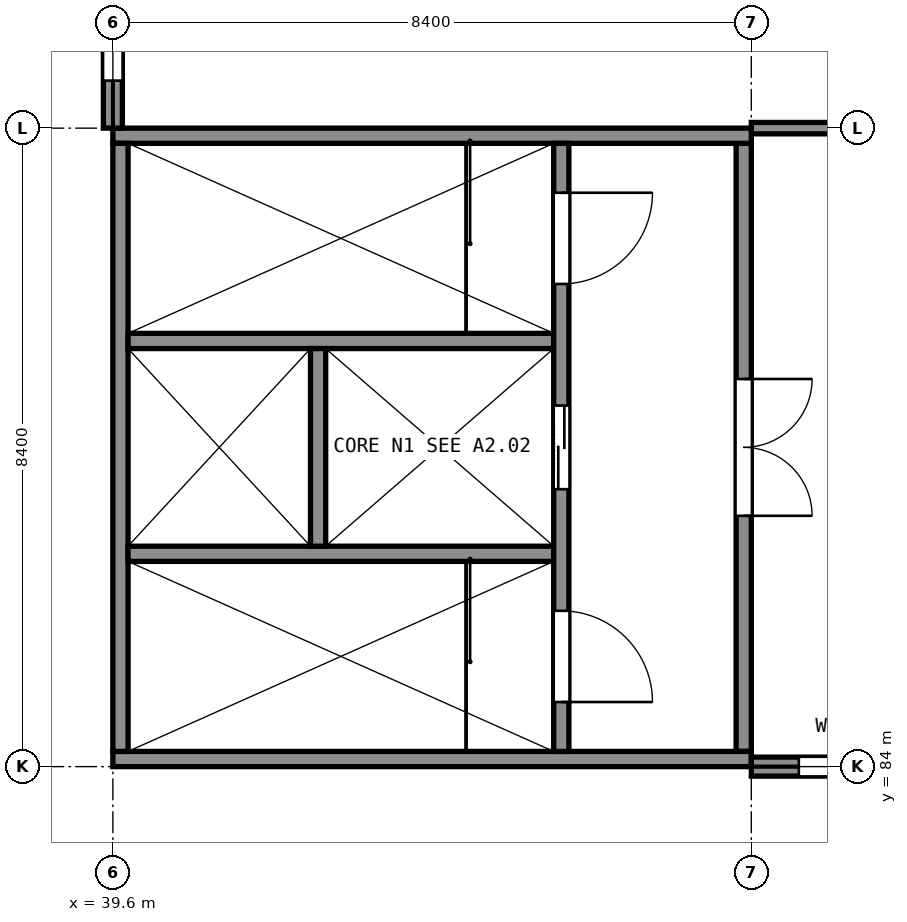
"""IFC4 building model, lengths in metres.
Left out: names, types, materials, properties, quantities, classifications, styles, units other than length and angle.
Written with IfcOpenShell. Run it as: python <this file> out.ifc"""

import sys

from ifc_helpers import new_model, si_unit, direction, frame, frame_2d, origin, place, context, subcontext, project, spatial, polyline, rectangle, outline, extrude, element, fill, save


model = new_model("IFC4")
c1 = context("Model", 3, precision=1e-05, world=origin(), true_north=direction((0.0, 1.0)))
c2 = subcontext(c1, "Body", "Model", "MODEL_VIEW")
j1 = project(units=[si_unit("LENGTHUNIT", "METRE"), si_unit("PLANEANGLEUNIT", "RADIAN")], contexts=[c1])
p1 = place(None, origin())
s1 = spatial("IfcSite", under=j1, at=p1, CompositionType="ELEMENT")
p2 = place(p1, origin())
s2 = spatial("IfcBuilding", under=s1, at=p2, CompositionType="ELEMENT")
p3 = place(p2, frame((0.0, 0.0, 20.0)))
s3 = spatial("IfcBuildingStorey", under=s2, at=p3, CompositionType="ELEMENT", Elevation=20.0)
p4 = place(p3, frame((39.6, 84.1, 0.0), z_axis=(0.0, 0.0, 1.0), x_axis=(1.0, 0.0, 0.0)))
e1 = element("IfcWall", 1, at=p4, inside=s3, PredefinedType="SHEAR", context=c2, shape_type="SweptSolid", body=[
    extrude(rectangle(XDim=8.4, YDim=0.2, at=frame_2d((4.2, 0.0))), origin(), (0.0, 0.0, 1.0), 10.375),
])
p5 = place(p3, frame((39.6, 92.3, 0.0), z_axis=(0.0, 0.0, 1.0), x_axis=(1.0, 0.0, 0.0)))
e2 = element("IfcWall", 2, at=p5, inside=s3, PredefinedType="SHEAR", context=c2, shape_type="SweptSolid", body=[
    extrude(rectangle(XDim=8.4, YDim=0.2, at=frame_2d((4.2, 0.0))), origin(), (0.0, 0.0, 1.0), 8.425),
])
p6 = place(p3, frame((39.7, 84.2, 0.0), z_axis=(0.0, 0.0, 1.0), x_axis=(0.0, 1.0, 0.0)))
e3 = element("IfcWall", 3, at=p6, inside=s3, PredefinedType="SHEAR", context=c2, shape_type="SweptSolid", body=[
    extrude(outline(polyline([(0.0, 0.0), (8.0, 0.0), (8.0, 8.448), (7.704, 8.518), (7.407, 8.589), (7.111, 8.659), (6.815, 8.73), (6.519, 8.8), (6.222, 8.871), (5.926, 8.941), (5.333, 9.083), (5.037, 9.153), (4.741, 9.224), (4.444, 9.294), (4.148, 9.365), (3.852, 9.435), (3.556, 9.506), (3.259, 9.576), (2.963, 9.647), (2.667, 9.717), (2.074, 9.859), (1.778, 9.929), (1.481, 10.0), (1.185, 10.07), (0.889, 10.141), (0.593, 10.211), (0.296, 10.282), (0.0, 10.352), (0.0, 0.0)])), frame((0.0, 0.1, 0.0), z_axis=(0.0, -1.0, 0.0), x_axis=(1.0, 0.0, 0.0)), (0.0, 0.0, 1.0), 0.2),
])
p7 = place(p3, frame((47.9, 84.2, 0.0), z_axis=(0.0, 0.0, 1.0), x_axis=(0.0, 1.0, 0.0)))
e4 = element("IfcWall", 4, at=p7, inside=s3, PredefinedType="SHEAR", context=c2, shape_type="SweptSolid", body=[
    extrude(outline(polyline([(0.0, 0.0), (8.0, 0.0), (8.0, 8.448), (7.704, 8.518), (7.407, 8.589), (7.111, 8.659), (6.815, 8.73), (6.519, 8.8), (6.222, 8.871), (5.926, 8.941), (5.333, 9.083), (5.037, 9.153), (4.741, 9.224), (4.444, 9.294), (4.148, 9.365), (3.852, 9.435), (3.556, 9.506), (3.259, 9.576), (2.963, 9.647), (2.667, 9.717), (2.074, 9.859), (1.778, 9.929), (1.481, 10.0), (1.185, 10.07), (0.889, 10.141), (0.593, 10.211), (0.296, 10.282), (0.0, 10.352), (0.0, 0.0)])), frame((0.0, 0.1, 0.0), z_axis=(0.0, -1.0, 0.0), x_axis=(1.0, 0.0, 0.0)), (0.0, 0.0, 1.0), 0.2),
])
p8 = place(p7, frame((3.1, 0.0, 0.0)))
e5 = element("IfcOpeningElement", 5, at=p8, cuts=e4, PredefinedType="OPENING", context=c2, shape_type="SweptSolid", body=[
    extrude(rectangle(XDim=1.8, YDim=2.1, at=frame_2d((0.9, 1.05))), frame((0.0, 0.11, 0.0), z_axis=(0.0, -1.0, 0.0), x_axis=(1.0, 0.0, 0.0)), (0.0, 0.0, 1.0), 0.22),
])
p9 = place(p3, frame((45.5, 84.2, 0.0), z_axis=(0.0, 0.0, 1.0), x_axis=(0.0, 1.0, 0.0)))
e6 = element("IfcWall", 6, at=p9, inside=s3, PredefinedType="SHEAR", context=c2, shape_type="SweptSolid", body=[
    extrude(outline(polyline([(0.0, 0.0), (8.0, 0.0), (8.0, 8.448), (7.704, 8.518), (7.407, 8.589), (7.111, 8.659), (6.815, 8.73), (6.519, 8.8), (6.222, 8.871), (5.926, 8.941), (5.333, 9.083), (5.037, 9.153), (4.741, 9.224), (4.444, 9.294), (4.148, 9.365), (3.852, 9.435), (3.556, 9.506), (3.259, 9.576), (2.963, 9.647), (2.667, 9.717), (2.074, 9.859), (1.778, 9.929), (1.481, 10.0), (1.185, 10.07), (0.889, 10.141), (0.593, 10.211), (0.296, 10.282), (0.0, 10.352), (0.0, 0.0)])), frame((0.0, 0.1, 0.0), z_axis=(0.0, -1.0, 0.0), x_axis=(1.0, 0.0, 0.0)), (0.0, 0.0, 1.0), 0.2),
])
p10 = place(p9, frame((0.65, 0.0, 0.0)))
e7 = element("IfcOpeningElement", 7, at=p10, cuts=e6, PredefinedType="OPENING", context=c2, shape_type="SweptSolid", body=[
    extrude(rectangle(XDim=1.2, YDim=2.1, at=frame_2d((0.6, 1.05))), frame((0.0, 0.11, 0.0), z_axis=(0.0, -1.0, 0.0), x_axis=(1.0, 0.0, 0.0)), (0.0, 0.0, 1.0), 0.22),
])
p11 = place(p9, frame((6.15, 0.0, 0.0)))
e8 = element("IfcOpeningElement", 8, at=p11, cuts=e6, PredefinedType="OPENING", context=c2, shape_type="SweptSolid", body=[
    extrude(rectangle(XDim=1.2, YDim=2.1, at=frame_2d((0.6, 1.05))), frame((0.0, 0.11, 0.0), z_axis=(0.0, -1.0, 0.0), x_axis=(1.0, 0.0, 0.0)), (0.0, 0.0, 1.0), 0.22),
])
p12 = place(p9, frame((3.45, 0.0, 0.0)))
e9 = element("IfcOpeningElement", 9, at=p12, cuts=e6, PredefinedType="OPENING", context=c2, shape_type="SweptSolid", body=[
    extrude(rectangle(XDim=1.1, YDim=2.1, at=frame_2d((0.55, 1.05))), frame((0.0, 0.11, 0.0), z_axis=(0.0, -1.0, 0.0), x_axis=(1.0, 0.0, 0.0)), (0.0, 0.0, 1.0), 0.22),
])
p13 = place(p3, frame((39.8, 86.8, 0.0), z_axis=(0.0, 0.0, 1.0), x_axis=(1.0, 0.0, 0.0)))
e10 = element("IfcWall", 10, at=p13, inside=s3, PredefinedType="SHEAR", context=c2, shape_type="SweptSolid", body=[
    extrude(rectangle(XDim=5.6, YDim=0.2, at=frame_2d((2.8, 0.0))), origin(), (0.0, 0.0, 1.0), 9.732),
])
p14 = place(p3, frame((39.8, 89.6, 0.0), z_axis=(0.0, 0.0, 1.0), x_axis=(1.0, 0.0, 0.0)))
e11 = element("IfcWall", 11, at=p14, inside=s3, PredefinedType="SHEAR", context=c2, shape_type="SweptSolid", body=[
    extrude(rectangle(XDim=5.6, YDim=0.2, at=frame_2d((2.8, 0.0))), origin(), (0.0, 0.0, 1.0), 9.067),
])
p15 = place(p3, frame((42.3, 86.9, 0.0), z_axis=(0.0, 0.0, 1.0), x_axis=(0.0, 1.0, 0.0)))
e12 = element("IfcWall", 12, at=p15, inside=s3, PredefinedType="SHEAR", context=c2, shape_type="SweptSolid", body=[
    extrude(outline(polyline([(0.0, 0.0), (2.6, 0.0), (2.6, 9.09), (1.444, 9.366), (1.156, 9.434), (0.0, 9.71), (0.0, 0.0)])), frame((0.0, 0.1, 0.0), z_axis=(0.0, -1.0, 0.0), x_axis=(1.0, 0.0, 0.0)), (0.0, 0.0, 1.0), 0.2),
])
p16 = place(p3, frame((39.6, 92.4, 0.0), z_axis=(0.0, 0.0, 1.0), x_axis=(0.0, 1.0, 0.0)))
e13 = element("IfcWall", 13, at=p16, inside=s3, PredefinedType="SOLIDWALL", context=c2, shape_type="SweptSolid", body=[
    extrude(outline(polyline([(0.0, 0.0), (8.05, 0.0), (8.05, 6.433), (0.0, 8.349), (0.0, 0.0)])), frame((0.0, 0.125, 0.0), z_axis=(0.0, -1.0, 0.0), x_axis=(1.0, 0.0, 0.0)), (0.0, 0.0, 1.0), 0.25),
])
p17 = place(p16, frame((0.625, 0.0, 0.9)))
e14 = element("IfcOpeningElement", 14, at=p17, cuts=e13, PredefinedType="OPENING", context=c2, shape_type="SweptSolid", body=[
    extrude(rectangle(XDim=1.2, YDim=2.1, at=frame_2d((0.6, 1.05))), frame((0.0, 0.135, 0.0), z_axis=(0.0, -1.0, 0.0), x_axis=(1.0, 0.0, 0.0)), (0.0, 0.0, 1.0), 0.27),
])
p18 = place(p16, frame((3.425, 0.0, 0.9)))
e15 = element("IfcOpeningElement", 15, at=p18, cuts=e13, PredefinedType="OPENING", context=c2, shape_type="SweptSolid", body=[
    extrude(rectangle(XDim=1.2, YDim=2.1, at=frame_2d((0.6, 1.05))), frame((0.0, 0.135, 0.0), z_axis=(0.0, -1.0, 0.0), x_axis=(1.0, 0.0, 0.0)), (0.0, 0.0, 1.0), 0.27),
])
p19 = place(p16, frame((6.225, 0.0, 0.9)))
e16 = element("IfcOpeningElement", 16, at=p19, cuts=e13, PredefinedType="OPENING", context=c2, shape_type="SweptSolid", body=[
    extrude(rectangle(XDim=1.2, YDim=2.1, at=frame_2d((0.6, 1.05))), frame((0.0, 0.135, 0.0), z_axis=(0.0, -1.0, 0.0), x_axis=(1.0, 0.0, 0.0)), (0.0, 0.0, 1.0), 0.27),
])
p20 = place(p3, frame((48.0, 84.0, 0.0), z_axis=(0.0, 0.0, 1.0), x_axis=(1.0, 0.0, 0.0)))
e17 = element("IfcWall", 17, at=p20, inside=s3, PredefinedType="SOLIDWALL", context=c2, shape_type="SweptSolid", body=[
    extrude(rectangle(XDim=8.05, YDim=0.25, at=frame_2d((4.025, 0.0))), origin(), (0.0, 0.0, 1.0), 10.349),
])
p21 = place(p20, frame((0.625, 0.0, 0.9)))
e18 = element("IfcOpeningElement", 18, at=p21, cuts=e17, PredefinedType="OPENING", context=c2, shape_type="SweptSolid", body=[
    extrude(rectangle(XDim=1.2, YDim=2.1, at=frame_2d((0.6, 1.05))), frame((0.0, 0.135, 0.0), z_axis=(0.0, -1.0, 0.0), x_axis=(1.0, 0.0, 0.0)), (0.0, 0.0, 1.0), 0.27),
])
p22 = place(p20, frame((3.425, 0.0, 0.9)))
e19 = element("IfcOpeningElement", 19, at=p22, cuts=e17, PredefinedType="OPENING", context=c2, shape_type="SweptSolid", body=[
    extrude(rectangle(XDim=1.2, YDim=2.1, at=frame_2d((0.6, 1.05))), frame((0.0, 0.135, 0.0), z_axis=(0.0, -1.0, 0.0), x_axis=(1.0, 0.0, 0.0)), (0.0, 0.0, 1.0), 0.27),
])
p23 = place(p20, frame((6.225, 0.0, 0.9)))
e20 = element("IfcOpeningElement", 20, at=p23, cuts=e17, PredefinedType="OPENING", context=c2, shape_type="SweptSolid", body=[
    extrude(rectangle(XDim=1.2, YDim=2.1, at=frame_2d((0.6, 1.05))), frame((0.0, 0.135, 0.0), z_axis=(0.0, -1.0, 0.0), x_axis=(1.0, 0.0, 0.0)), (0.0, 0.0, 1.0), 0.27),
])
p24 = place(p3, frame((48.0, 92.4, 0.0), z_axis=(0.0, 0.0, 1.0), x_axis=(1.0, 0.0, 0.0)))
e21 = element("IfcWall", 21, at=p24, inside=s3, PredefinedType="PARTITIONING", context=c2, shape_type="SweptSolid", body=[
    extrude(rectangle(XDim=8.05, YDim=0.15, at=frame_2d((4.025, 0.0))), origin(), (0.0, 0.0, 1.0), 7.9),
])
p25 = place(p24, frame((1.325, 0.0, 0.0)))
e22 = element("IfcOpeningElement", 22, at=p25, cuts=e21, PredefinedType="OPENING", context=c2, shape_type="SweptSolid", body=[
    extrude(rectangle(XDim=1.8, YDim=2.1, at=frame_2d((0.9, 1.05))), frame((0.0, 0.085, 0.0), z_axis=(0.0, -1.0, 0.0), x_axis=(1.0, 0.0, 0.0)), (0.0, 0.0, 1.0), 0.17),
])
p26 = place(p17, origin())
e23 = element("IfcWindow", 23, at=p26, inside=s3, PartitioningType="SINGLE_PANEL", PredefinedType="WINDOW", context=c2, shape_type="SweptSolid", body=[
    extrude(rectangle(XDim=1.2, YDim=2.1, at=frame_2d((0.6, 1.05))), frame((0.0, -0.045, 0.0), z_axis=(0.0, -1.0, 0.0), x_axis=(1.0, 0.0, 0.0)), (0.0, 0.0, 1.0), 0.06),
])
fill(e14, e23)
p27 = place(p21, origin())
e24 = element("IfcWindow", 24, at=p27, inside=s3, PartitioningType="SINGLE_PANEL", PredefinedType="WINDOW", context=c2, shape_type="SweptSolid", body=[
    extrude(rectangle(XDim=1.2, YDim=2.1, at=frame_2d((0.6, 1.05))), frame((0.0, 0.105, 0.0), z_axis=(0.0, -1.0, 0.0), x_axis=(1.0, 0.0, 0.0)), (0.0, 0.0, 1.0), 0.06),
])
fill(e18, e24)
p28 = place(p8, origin())
e25 = element("IfcDoor", 25, at=p28, inside=s3, OperationType="DOUBLE_DOOR_SINGLE_SWING", PredefinedType="DOOR", context=c2, shape_type="SweptSolid", body=[
    extrude(rectangle(XDim=1.8, YDim=2.1, at=frame_2d((0.9, 1.05))), frame((0.0, 0.025, 0.0), z_axis=(0.0, -1.0, 0.0), x_axis=(1.0, 0.0, 0.0)), (0.0, 0.0, 1.0), 0.05),
])
fill(e5, e25)
p29 = place(p10, origin())
e26 = element("IfcDoor", 26, at=p29, inside=s3, OperationType="SINGLE_SWING_LEFT", PredefinedType="DOOR", context=c2, shape_type="SweptSolid", body=[
    extrude(rectangle(XDim=1.2, YDim=2.1, at=frame_2d((0.6, 1.05))), frame((0.0, 0.025, 0.0), z_axis=(0.0, -1.0, 0.0), x_axis=(1.0, 0.0, 0.0)), (0.0, 0.0, 1.0), 0.05),
])
fill(e7, e26)
p30 = place(p11, origin())
e27 = element("IfcDoor", 27, at=p30, inside=s3, OperationType="SINGLE_SWING_RIGHT", PredefinedType="DOOR", context=c2, shape_type="SweptSolid", body=[
    extrude(rectangle(XDim=1.2, YDim=2.1, at=frame_2d((0.6, 1.05))), frame((0.0, 0.025, 0.0), z_axis=(0.0, -1.0, 0.0), x_axis=(1.0, 0.0, 0.0)), (0.0, 0.0, 1.0), 0.05),
])
fill(e8, e27)
p31 = place(p12, origin())
e28 = element("IfcDoor", 28, at=p31, inside=s3, OperationType="DOUBLE_DOOR_SLIDING", PredefinedType="DOOR", context=c2, shape_type="SweptSolid", body=[
    extrude(rectangle(XDim=1.1, YDim=2.1, at=frame_2d((0.55, 1.05))), frame((0.0, 0.025, 0.0), z_axis=(0.0, -1.0, 0.0), x_axis=(1.0, 0.0, 0.0)), (0.0, 0.0, 1.0), 0.05),
])
fill(e9, e28)
save(model, sys.argv[1])
